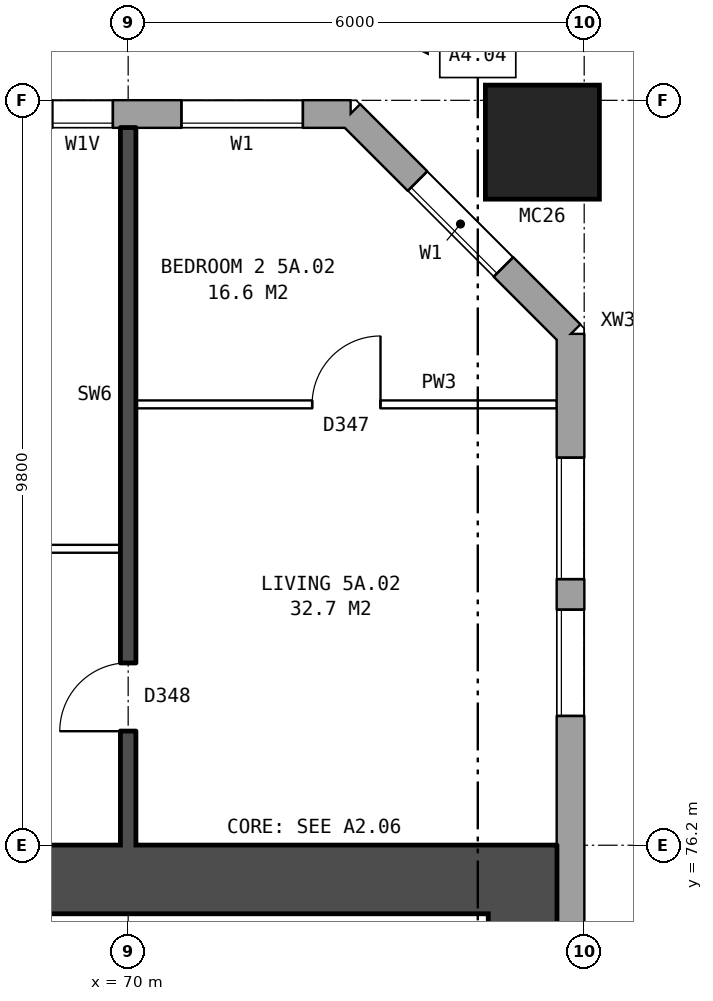
"""IFC4 building model, lengths in metres.
Left out: names, types, materials, properties, quantities, classifications, styles, units other than length and angle.
Written with IfcOpenShell. Run it as: python <this file> out.ifc"""

import sys

from ifc_helpers import new_model, si_unit, direction, frame, frame_2d, origin, origin_2d, place, context, subcontext, project, spatial, rectangle, hollow_rectangle, extrude, element, fill, save


model = new_model("IFC4")
c1 = context("Model", 3, precision=1e-05, world=origin(), true_north=direction((0.0, 1.0)))
c2 = subcontext(c1, "Body", "Model", "MODEL_VIEW")
j1 = project(units=[si_unit("LENGTHUNIT", "METRE"), si_unit("PLANEANGLEUNIT", "RADIAN")], contexts=[c1])
p1 = place(None, origin())
s1 = spatial("IfcSite", under=j1, at=p1, CompositionType="ELEMENT")
p2 = place(p1, origin())
s2 = spatial("IfcBuilding", under=s1, at=p2, CompositionType="ELEMENT")
p3 = place(p2, frame((0.0, 0.0, 22.6)))
s3 = spatial("IfcBuildingStorey", under=s2, at=p3, CompositionType="ELEMENT", Elevation=22.6)
p4 = place(p3, frame((75.45, 85.45, 0.0), z_axis=(0.0, 0.0, 1.0), x_axis=(1.0, 0.0, 0.0)))
e1 = element("IfcColumn", 1, at=p4, inside=s3, PredefinedType="COLUMN", context=c2, shape_type="SweptSolid", body=[
    extrude(hollow_rectangle(XDim=1.5, YDim=1.5, WallThickness=0.08, at=origin_2d()), origin(), (0.0, 0.0, 1.0), 3.1),
])
p5 = place(p3, frame((75.82, 57.075, 0.0), z_axis=(0.0, 0.0, 1.0), x_axis=(0.0, 1.0, 0.0)))
e2 = element("IfcWall", 2, at=p5, inside=s3, PredefinedType="STANDARD", context=c2, shape_type="SweptSolid", body=[
    extrude(rectangle(XDim=25.851, YDim=0.36, at=frame_2d((12.925, 0.0))), origin(), (0.0, 0.0, 1.0), 2.85),
])
p6 = place(p5, frame((1.625, 0.0, 0.8)))
e3 = element("IfcOpeningElement", 3, at=p6, cuts=e2, PredefinedType="OPENING", context=c2, shape_type="SweptSolid", body=[
    extrude(rectangle(XDim=1.6, YDim=1.8, at=frame_2d((0.8, 0.9))), frame((0.0, 0.19, 0.0), z_axis=(0.0, -1.0, 0.0), x_axis=(1.0, 0.0, 0.0)), (0.0, 0.0, 1.0), 0.38),
])
p7 = place(p5, frame((3.525, 0.0, 1.7)))
e4 = element("IfcOpeningElement", 4, at=p7, cuts=e2, PredefinedType="OPENING", context=c2, shape_type="SweptSolid", body=[
    extrude(rectangle(XDim=1.4, YDim=0.9, at=frame_2d((0.7, 0.45))), frame((0.0, 0.19, 0.0), z_axis=(0.0, -1.0, 0.0), x_axis=(1.0, 0.0, 0.0)), (0.0, 0.0, 1.0), 0.38),
])
p8 = place(p5, frame((20.825, 0.0, 1.7)))
e5 = element("IfcOpeningElement", 5, at=p8, cuts=e2, PredefinedType="OPENING", context=c2, shape_type="SweptSolid", body=[
    extrude(rectangle(XDim=1.4, YDim=0.9, at=frame_2d((0.7, 0.45))), frame((0.0, 0.19, 0.0), z_axis=(0.0, -1.0, 0.0), x_axis=(1.0, 0.0, 0.0)), (0.0, 0.0, 1.0), 0.38),
])
p9 = place(p5, frame((22.625, 0.0, 0.8)))
e6 = element("IfcOpeningElement", 6, at=p9, cuts=e2, PredefinedType="OPENING", context=c2, shape_type="SweptSolid", body=[
    extrude(rectangle(XDim=1.6, YDim=1.8, at=frame_2d((0.8, 0.9))), frame((0.0, 0.19, 0.0), z_axis=(0.0, -1.0, 0.0), x_axis=(1.0, 0.0, 0.0)), (0.0, 0.0, 1.0), 0.38),
])
p10 = place(p3, frame((75.82, 82.925, 0.0), z_axis=(0.0, 0.0, 1.0), x_axis=(-0.707106781187, 0.707106781187, 0.0)))
e7 = element("IfcWall", 7, at=p10, inside=s3, PredefinedType="STANDARD", context=c2, shape_type="SweptSolid", body=[
    extrude(rectangle(XDim=4.094, YDim=0.36, at=frame_2d((2.047, 0.0))), origin(), (0.0, 0.0, 1.0), 2.85),
])
p11 = place(p10, frame((1.247, 0.0, 0.8)))
e8 = element("IfcOpeningElement", 8, at=p11, cuts=e7, PredefinedType="OPENING", context=c2, shape_type="SweptSolid", body=[
    extrude(rectangle(XDim=1.6, YDim=1.8, at=frame_2d((0.8, 0.9))), frame((0.0, 0.19, 0.0), z_axis=(0.0, -1.0, 0.0), x_axis=(1.0, 0.0, 0.0)), (0.0, 0.0, 1.0), 0.38),
])
p12 = place(p3, frame((72.925, 85.82, 0.0), z_axis=(0.0, 0.0, 1.0), x_axis=(-1.0, 0.0, 0.0)))
e9 = element("IfcWall", 9, at=p12, inside=s3, PredefinedType="STANDARD", context=c2, shape_type="SweptSolid", body=[
    extrude(rectangle(XDim=50.101, YDim=0.36, at=frame_2d((25.05, 0.0))), origin(), (0.0, 0.0, 1.0), 2.85),
])
p13 = place(p12, frame((0.625, 0.0, 0.8)))
e10 = element("IfcOpeningElement", 10, at=p13, cuts=e9, PredefinedType="OPENING", context=c2, shape_type="SweptSolid", body=[
    extrude(rectangle(XDim=1.6, YDim=1.8, at=frame_2d((0.8, 0.9))), frame((0.0, 0.19, 0.0), z_axis=(0.0, -1.0, 0.0), x_axis=(1.0, 0.0, 0.0)), (0.0, 0.0, 1.0), 0.38),
])
p14 = place(p12, frame((3.125, 0.0, 1.7)))
e11 = element("IfcOpeningElement", 11, at=p14, cuts=e9, PredefinedType="OPENING", context=c2, shape_type="SweptSolid", body=[
    extrude(rectangle(XDim=0.8, YDim=0.9, at=frame_2d((0.4, 0.45))), frame((0.0, 0.19, 0.0), z_axis=(0.0, -1.0, 0.0), x_axis=(1.0, 0.0, 0.0)), (0.0, 0.0, 1.0), 0.38),
])
p15 = place(p12, frame((6.625, 0.0, 0.8)))
e12 = element("IfcOpeningElement", 12, at=p15, cuts=e9, PredefinedType="OPENING", context=c2, shape_type="SweptSolid", body=[
    extrude(rectangle(XDim=1.6, YDim=1.8, at=frame_2d((0.8, 0.9))), frame((0.0, 0.19, 0.0), z_axis=(0.0, -1.0, 0.0), x_axis=(1.0, 0.0, 0.0)), (0.0, 0.0, 1.0), 0.38),
])
p16 = place(p12, frame((9.625, 0.0, 0.8)))
e13 = element("IfcOpeningElement", 13, at=p16, cuts=e9, PredefinedType="OPENING", context=c2, shape_type="SweptSolid", body=[
    extrude(rectangle(XDim=1.6, YDim=1.8, at=frame_2d((0.8, 0.9))), frame((0.0, 0.19, 0.0), z_axis=(0.0, -1.0, 0.0), x_axis=(1.0, 0.0, 0.0)), (0.0, 0.0, 1.0), 0.38),
])
p17 = place(p12, frame((12.625, 0.0, 0.8)))
e14 = element("IfcOpeningElement", 14, at=p17, cuts=e9, PredefinedType="OPENING", context=c2, shape_type="SweptSolid", body=[
    extrude(rectangle(XDim=1.6, YDim=1.8, at=frame_2d((0.8, 0.9))), frame((0.0, 0.19, 0.0), z_axis=(0.0, -1.0, 0.0), x_axis=(1.0, 0.0, 0.0)), (0.0, 0.0, 1.0), 0.38),
])
p18 = place(p12, frame((15.625, 0.0, 0.8)))
e15 = element("IfcOpeningElement", 15, at=p18, cuts=e9, PredefinedType="OPENING", context=c2, shape_type="SweptSolid", body=[
    extrude(rectangle(XDim=1.6, YDim=1.8, at=frame_2d((0.8, 0.9))), frame((0.0, 0.19, 0.0), z_axis=(0.0, -1.0, 0.0), x_axis=(1.0, 0.0, 0.0)), (0.0, 0.0, 1.0), 0.38),
])
p19 = place(p12, frame((18.625, 0.0, 0.8)))
e16 = element("IfcOpeningElement", 16, at=p19, cuts=e9, PredefinedType="OPENING", context=c2, shape_type="SweptSolid", body=[
    extrude(rectangle(XDim=1.6, YDim=1.8, at=frame_2d((0.8, 0.9))), frame((0.0, 0.19, 0.0), z_axis=(0.0, -1.0, 0.0), x_axis=(1.0, 0.0, 0.0)), (0.0, 0.0, 1.0), 0.38),
])
p20 = place(p12, frame((21.625, 0.0, 0.8)))
e17 = element("IfcOpeningElement", 17, at=p20, cuts=e9, PredefinedType="OPENING", context=c2, shape_type="SweptSolid", body=[
    extrude(rectangle(XDim=1.6, YDim=1.8, at=frame_2d((0.8, 0.9))), frame((0.0, 0.19, 0.0), z_axis=(0.0, -1.0, 0.0), x_axis=(1.0, 0.0, 0.0)), (0.0, 0.0, 1.0), 0.38),
])
p21 = place(p12, frame((24.625, 0.0, 0.8)))
e18 = element("IfcOpeningElement", 18, at=p21, cuts=e9, PredefinedType="OPENING", context=c2, shape_type="SweptSolid", body=[
    extrude(rectangle(XDim=1.6, YDim=1.8, at=frame_2d((0.8, 0.9))), frame((0.0, 0.19, 0.0), z_axis=(0.0, -1.0, 0.0), x_axis=(1.0, 0.0, 0.0)), (0.0, 0.0, 1.0), 0.38),
])
p22 = place(p12, frame((27.625, 0.0, 0.8)))
e19 = element("IfcOpeningElement", 19, at=p22, cuts=e9, PredefinedType="OPENING", context=c2, shape_type="SweptSolid", body=[
    extrude(rectangle(XDim=1.6, YDim=1.8, at=frame_2d((0.8, 0.9))), frame((0.0, 0.19, 0.0), z_axis=(0.0, -1.0, 0.0), x_axis=(1.0, 0.0, 0.0)), (0.0, 0.0, 1.0), 0.38),
])
p23 = place(p12, frame((30.625, 0.0, 0.8)))
e20 = element("IfcOpeningElement", 20, at=p23, cuts=e9, PredefinedType="OPENING", context=c2, shape_type="SweptSolid", body=[
    extrude(rectangle(XDim=1.6, YDim=1.8, at=frame_2d((0.8, 0.9))), frame((0.0, 0.19, 0.0), z_axis=(0.0, -1.0, 0.0), x_axis=(1.0, 0.0, 0.0)), (0.0, 0.0, 1.0), 0.38),
])
p24 = place(p12, frame((33.625, 0.0, 0.8)))
e21 = element("IfcOpeningElement", 21, at=p24, cuts=e9, PredefinedType="OPENING", context=c2, shape_type="SweptSolid", body=[
    extrude(rectangle(XDim=1.6, YDim=1.8, at=frame_2d((0.8, 0.9))), frame((0.0, 0.19, 0.0), z_axis=(0.0, -1.0, 0.0), x_axis=(1.0, 0.0, 0.0)), (0.0, 0.0, 1.0), 0.38),
])
p25 = place(p12, frame((36.625, 0.0, 0.8)))
e22 = element("IfcOpeningElement", 22, at=p25, cuts=e9, PredefinedType="OPENING", context=c2, shape_type="SweptSolid", body=[
    extrude(rectangle(XDim=1.6, YDim=1.8, at=frame_2d((0.8, 0.9))), frame((0.0, 0.19, 0.0), z_axis=(0.0, -1.0, 0.0), x_axis=(1.0, 0.0, 0.0)), (0.0, 0.0, 1.0), 0.38),
])
p26 = place(p12, frame((39.625, 0.0, 0.8)))
e23 = element("IfcOpeningElement", 23, at=p26, cuts=e9, PredefinedType="OPENING", context=c2, shape_type="SweptSolid", body=[
    extrude(rectangle(XDim=1.6, YDim=1.8, at=frame_2d((0.8, 0.9))), frame((0.0, 0.19, 0.0), z_axis=(0.0, -1.0, 0.0), x_axis=(1.0, 0.0, 0.0)), (0.0, 0.0, 1.0), 0.38),
])
p27 = place(p12, frame((41.525, 0.0, 0.8)))
e24 = element("IfcOpeningElement", 24, at=p27, cuts=e9, PredefinedType="OPENING", context=c2, shape_type="SweptSolid", body=[
    extrude(rectangle(XDim=1.6, YDim=1.8, at=frame_2d((0.8, 0.9))), frame((0.0, 0.19, 0.0), z_axis=(0.0, -1.0, 0.0), x_axis=(1.0, 0.0, 0.0)), (0.0, 0.0, 1.0), 0.38),
])
p28 = place(p12, frame((46.525, 0.0, 1.4)))
e25 = element("IfcOpeningElement", 25, at=p28, cuts=e9, PredefinedType="OPENING", context=c2, shape_type="SweptSolid", body=[
    extrude(rectangle(XDim=1.0, YDim=1.2, at=frame_2d((0.5, 0.6))), frame((0.0, 0.19, 0.0), z_axis=(0.0, -1.0, 0.0), x_axis=(1.0, 0.0, 0.0)), (0.0, 0.0, 1.0), 0.38),
])
p29 = place(p12, frame((5.475, 0.0, 0.8)))
e26 = element("IfcOpeningElement", 26, at=p29, cuts=e9, PredefinedType="OPENING", context=c2, shape_type="SweptSolid", body=[
    extrude(rectangle(XDim=0.8, YDim=0.9, at=frame_2d((0.4, 0.45))), frame((0.0, 0.19, 0.0), z_axis=(0.0, -1.0, 0.0), x_axis=(1.0, 0.0, 0.0)), (0.0, 0.0, 1.0), 0.38),
])
p30 = place(p12, frame((43.425, 0.0, 0.8)))
e27 = element("IfcOpeningElement", 27, at=p30, cuts=e9, PredefinedType="OPENING", context=c2, shape_type="SweptSolid", body=[
    extrude(rectangle(XDim=0.6, YDim=1.2, at=frame_2d((0.3, 0.6))), frame((0.0, 0.19, 0.0), z_axis=(0.0, -1.0, 0.0), x_axis=(1.0, 0.0, 0.0)), (0.0, 0.0, 1.0), 0.38),
])
p31 = place(p12, frame((47.825, 0.0, 0.8)))
e28 = element("IfcOpeningElement", 28, at=p31, cuts=e9, PredefinedType="OPENING", context=c2, shape_type="SweptSolid", body=[
    extrude(rectangle(XDim=1.4, YDim=1.8, at=frame_2d((0.7, 0.9))), frame((0.0, 0.19, 0.0), z_axis=(0.0, -1.0, 0.0), x_axis=(1.0, 0.0, 0.0)), (0.0, 0.0, 1.0), 0.38),
])
p32 = place(p3, frame((75.19, 64.7, 0.0), z_axis=(0.0, 0.0, 1.0), x_axis=(0.0, 1.0, 0.0)))
e29 = element("IfcWall", 29, at=p32, inside=s3, PredefinedType="SHEAR", context=c2, shape_type="SweptSolid", body=[
    extrude(rectangle(XDim=10.6, YDim=0.9, at=frame_2d((5.3, 0.0))), origin(), (0.0, 0.0, 1.0), 2.85),
])
p33 = place(p3, frame((66.64, 75.75, 0.0), z_axis=(0.0, 0.0, 1.0), x_axis=(1.0, 0.0, 0.0)))
e30 = element("IfcWall", 30, at=p33, inside=s3, PredefinedType="SHEAR", context=c2, shape_type="SweptSolid", body=[
    extrude(rectangle(XDim=9.0, YDim=0.9, at=frame_2d((4.5, 0.0))), origin(), (0.0, 0.0, 1.0), 2.85),
])
p34 = place(p3, frame((64.1, 80.1, 0.0), z_axis=(0.0, 0.0, 1.0), x_axis=(1.0, 0.0, 0.0)))
e31 = element("IfcWall", 31, at=p34, inside=s3, PredefinedType="PARTITIONING", context=c2, shape_type="SweptSolid", body=[
    extrude(rectangle(XDim=5.8, YDim=0.1, at=frame_2d((2.9, 0.0))), origin(), (0.0, 0.0, 1.0), 2.85),
])
p35 = place(p34, frame((3.6, 0.0, 0.0)))
e32 = element("IfcOpeningElement", 32, at=p35, cuts=e31, PredefinedType="OPENING", context=c2, shape_type="SweptSolid", body=[
    extrude(rectangle(XDim=0.9, YDim=2.1, at=frame_2d((0.45, 1.05))), frame((0.0, 0.06, 0.0), z_axis=(0.0, -1.0, 0.0), x_axis=(1.0, 0.0, 0.0)), (0.0, 0.0, 1.0), 0.12),
])
p36 = place(p34, frame((0.7, 0.0, 0.0)))
e33 = element("IfcOpeningElement", 33, at=p36, cuts=e31, PredefinedType="OPENING", context=c2, shape_type="SweptSolid", body=[
    extrude(rectangle(XDim=0.9, YDim=2.1, at=frame_2d((0.45, 1.05))), frame((0.0, 0.06, 0.0), z_axis=(0.0, -1.0, 0.0), x_axis=(1.0, 0.0, 0.0)), (0.0, 0.0, 1.0), 0.12),
])
p37 = place(p3, frame((70.1, 82.0, 0.0), z_axis=(0.0, 0.0, 1.0), x_axis=(1.0, 0.0, 0.0)))
e34 = element("IfcWall", 34, at=p37, inside=s3, PredefinedType="PARTITIONING", context=c2, shape_type="SweptSolid", body=[
    extrude(rectangle(XDim=5.54, YDim=0.1, at=frame_2d((2.77, 0.0))), origin(), (0.0, 0.0, 1.0), 2.85),
])
p38 = place(p37, frame((2.32, 0.0, 0.0)))
e35 = element("IfcOpeningElement", 35, at=p38, cuts=e34, PredefinedType="OPENING", context=c2, shape_type="SweptSolid", body=[
    extrude(rectangle(XDim=0.9, YDim=2.1, at=frame_2d((0.45, 1.05))), frame((0.0, 0.06, 0.0), z_axis=(0.0, -1.0, 0.0), x_axis=(1.0, 0.0, 0.0)), (0.0, 0.0, 1.0), 0.12),
])
p39 = place(p3, frame((70.0, 76.2, 0.0), z_axis=(0.0, 0.0, 1.0), x_axis=(0.0, 1.0, 0.0)))
e36 = element("IfcWall", 36, at=p39, inside=s3, PredefinedType="SOLIDWALL", context=c2, shape_type="SweptSolid", body=[
    extrude(rectangle(XDim=9.44, YDim=0.2, at=frame_2d((4.72, 0.0))), origin(), (0.0, 0.0, 1.0), 2.85),
])
p40 = place(p39, frame((1.5, 0.0, 0.0)))
e37 = element("IfcOpeningElement", 37, at=p40, cuts=e36, PredefinedType="OPENING", context=c2, shape_type="SweptSolid", body=[
    extrude(rectangle(XDim=0.9, YDim=2.1, at=frame_2d((0.45, 1.05))), frame((0.0, 0.11, 0.0), z_axis=(0.0, -1.0, 0.0), x_axis=(1.0, 0.0, 0.0)), (0.0, 0.0, 1.0), 0.22),
])
p41 = place(p8, origin())
e38 = element("IfcWindow", 38, at=p41, inside=s3, PartitioningType="SINGLE_PANEL", PredefinedType="WINDOW", context=c2, shape_type="SweptSolid", body=[
    extrude(rectangle(XDim=1.4, YDim=0.9, at=frame_2d((0.7, 0.45))), frame((0.0, 0.15, 0.0), z_axis=(0.0, -1.0, 0.0), x_axis=(1.0, 0.0, 0.0)), (0.0, 0.0, 1.0), 0.06),
])
fill(e5, e38)
p42 = place(p9, origin())
e39 = element("IfcWindow", 39, at=p42, inside=s3, PartitioningType="SINGLE_PANEL", PredefinedType="WINDOW", context=c2, shape_type="SweptSolid", body=[
    extrude(rectangle(XDim=1.6, YDim=1.8, at=frame_2d((0.8, 0.9))), frame((0.0, 0.15, 0.0), z_axis=(0.0, -1.0, 0.0), x_axis=(1.0, 0.0, 0.0)), (0.0, 0.0, 1.0), 0.06),
])
fill(e6, e39)
p43 = place(p11, origin())
e40 = element("IfcWindow", 40, at=p43, inside=s3, PartitioningType="SINGLE_PANEL", PredefinedType="WINDOW", context=c2, shape_type="SweptSolid", body=[
    extrude(rectangle(XDim=1.6, YDim=1.8, at=frame_2d((0.8, 0.9))), frame((0.0, 0.15, 0.0), z_axis=(0.0, -1.0, 0.0), x_axis=(1.0, 0.0, 0.0)), (0.0, 0.0, 1.0), 0.06),
])
fill(e8, e40)
p44 = place(p13, origin())
e41 = element("IfcWindow", 41, at=p44, inside=s3, PartitioningType="SINGLE_PANEL", PredefinedType="WINDOW", context=c2, shape_type="SweptSolid", body=[
    extrude(rectangle(XDim=1.6, YDim=1.8, at=frame_2d((0.8, 0.9))), frame((0.0, 0.15, 0.0), z_axis=(0.0, -1.0, 0.0), x_axis=(1.0, 0.0, 0.0)), (0.0, 0.0, 1.0), 0.06),
])
fill(e10, e41)
p45 = place(p14, origin())
e42 = element("IfcWindow", 42, at=p45, inside=s3, PartitioningType="SINGLE_PANEL", PredefinedType="WINDOW", context=c2, shape_type="SweptSolid", body=[
    extrude(rectangle(XDim=0.8, YDim=0.9, at=frame_2d((0.4, 0.45))), frame((0.0, 0.15, 0.0), z_axis=(0.0, -1.0, 0.0), x_axis=(1.0, 0.0, 0.0)), (0.0, 0.0, 1.0), 0.06),
])
fill(e11, e42)
p46 = place(p38, origin())
e43 = element("IfcDoor", 43, at=p46, inside=s3, OperationType="SINGLE_SWING_RIGHT", PredefinedType="DOOR", context=c2, shape_type="SweptSolid", body=[
    extrude(rectangle(XDim=0.9, YDim=2.1, at=frame_2d((0.45, 1.05))), frame((0.0, 0.025, 0.0), z_axis=(0.0, -1.0, 0.0), x_axis=(1.0, 0.0, 0.0)), (0.0, 0.0, 1.0), 0.05),
])
fill(e35, e43)
p47 = place(p40, origin())
e44 = element("IfcDoor", 44, at=p47, inside=s3, OperationType="SINGLE_SWING_LEFT", PredefinedType="DOOR", context=c2, shape_type="SweptSolid", body=[
    extrude(rectangle(XDim=0.9, YDim=2.1, at=frame_2d((0.45, 1.05))), frame((0.0, 0.025, 0.0), z_axis=(0.0, -1.0, 0.0), x_axis=(1.0, 0.0, 0.0)), (0.0, 0.0, 1.0), 0.05),
])
fill(e37, e44)
save(model, sys.argv[1])
